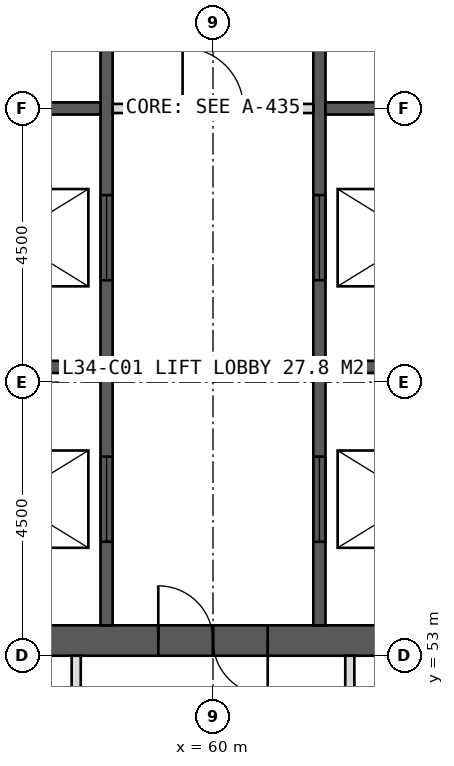
"""IFC4 building model, lengths in metres.
Left out: names, types, materials, properties, quantities, classifications, styles, units other than length and angle.
Written with IfcOpenShell. Run it as: python <this file> out.ifc"""

import sys

from ifc_helpers import new_model, si_unit, direction, frame, frame_2d, origin, place, context, subcontext, project, spatial, rectangle, extrude, element, fill, save


model = new_model("IFC4")
c1 = context("Model", 3, precision=1e-05, world=origin(), true_north=direction((0.0, 1.0)))
c2 = subcontext(c1, "Body", "Model", "MODEL_VIEW")
j1 = project(units=[si_unit("LENGTHUNIT", "METRE"), si_unit("PLANEANGLEUNIT", "RADIAN")], contexts=[c1])
p1 = place(None, origin())
s1 = spatial("IfcSite", under=j1, at=p1, CompositionType="ELEMENT")
p2 = place(p1, origin())
s2 = spatial("IfcBuilding", under=s1, at=p2, CompositionType="ELEMENT")
p3 = place(p2, frame((0.0, 0.0, 144.0)))
s3 = spatial("IfcBuildingStorey", under=s2, at=p3, CompositionType="ELEMENT", Elevation=144.0)
p4 = place(p3, frame((51.0, 53.25, 0.0), z_axis=(0.0, 0.0, 1.0), x_axis=(1.0, 0.0, 0.0)))
e1 = element("IfcWall", 1, at=p4, inside=s3, PredefinedType="SHEAR", context=c2, shape_type="SweptSolid", body=[
    extrude(rectangle(XDim=18.0, YDim=0.5, at=frame_2d((9.0, 0.0))), origin(), (0.0, 0.0, 1.0), 4.0),
])
p5 = place(p4, frame((8.1, 0.0, 0.0)))
e2 = element("IfcOpeningElement", 2, at=p5, cuts=e1, PredefinedType="OPENING", context=c2, shape_type="SweptSolid", body=[
    extrude(rectangle(XDim=1.8, YDim=2.2, at=frame_2d((0.9, 1.1))), frame((0.0, 0.26, 0.0), z_axis=(0.0, -1.0, 0.0), x_axis=(1.0, 0.0, 0.0)), (0.0, 0.0, 1.0), 0.52),
])
p6 = place(p3, frame((58.25, 53.5, 0.0), z_axis=(0.0, 0.0, 1.0), x_axis=(0.0, 1.0, 0.0)))
e3 = element("IfcWall", 3, at=p6, inside=s3, PredefinedType="SHEAR", context=c2, shape_type="SweptSolid", body=[
    extrude(rectangle(XDim=17.0, YDim=0.2, at=frame_2d((8.5, 0.0))), origin(), (0.0, 0.0, 1.0), 4.0),
])
p7 = place(p6, frame((1.375, 0.0, 0.0)))
e4 = element("IfcOpeningElement", 4, at=p7, cuts=e3, PredefinedType="OPENING", context=c2, shape_type="SweptSolid", body=[
    extrude(rectangle(XDim=1.4, YDim=2.2, at=frame_2d((0.7, 1.1))), frame((0.0, 0.11, 0.0), z_axis=(0.0, -1.0, 0.0), x_axis=(1.0, 0.0, 0.0)), (0.0, 0.0, 1.0), 0.22),
])
p8 = place(p6, frame((5.675, 0.0, 0.0)))
e5 = element("IfcOpeningElement", 5, at=p8, cuts=e3, PredefinedType="OPENING", context=c2, shape_type="SweptSolid", body=[
    extrude(rectangle(XDim=1.4, YDim=2.2, at=frame_2d((0.7, 1.1))), frame((0.0, 0.11, 0.0), z_axis=(0.0, -1.0, 0.0), x_axis=(1.0, 0.0, 0.0)), (0.0, 0.0, 1.0), 0.22),
])
p9 = place(p3, frame((61.75, 53.5, 0.0), z_axis=(0.0, 0.0, 1.0), x_axis=(0.0, 1.0, 0.0)))
e6 = element("IfcWall", 6, at=p9, inside=s3, PredefinedType="SHEAR", context=c2, shape_type="SweptSolid", body=[
    extrude(rectangle(XDim=17.0, YDim=0.2, at=frame_2d((8.5, 0.0))), origin(), (0.0, 0.0, 1.0), 4.0),
])
p10 = place(p9, frame((1.375, 0.0, 0.0)))
e7 = element("IfcOpeningElement", 7, at=p10, cuts=e6, PredefinedType="OPENING", context=c2, shape_type="SweptSolid", body=[
    extrude(rectangle(XDim=1.4, YDim=2.2, at=frame_2d((0.7, 1.1))), frame((0.0, 0.11, 0.0), z_axis=(0.0, -1.0, 0.0), x_axis=(1.0, 0.0, 0.0)), (0.0, 0.0, 1.0), 0.22),
])
p11 = place(p9, frame((5.675, 0.0, 0.0)))
e8 = element("IfcOpeningElement", 8, at=p11, cuts=e6, PredefinedType="OPENING", context=c2, shape_type="SweptSolid", body=[
    extrude(rectangle(XDim=1.4, YDim=2.2, at=frame_2d((0.7, 1.1))), frame((0.0, 0.11, 0.0), z_axis=(0.0, -1.0, 0.0), x_axis=(1.0, 0.0, 0.0)), (0.0, 0.0, 1.0), 0.22),
])
for number, where, z_axis, x_axis in (
    (9, (55.1, 57.75, 0.0), (0.0, 0.0, 1.0), (1.0, 0.0, 0.0)),
    (10, (61.85, 57.75, 0.0), (0.0, 0.0, 1.0), (1.0, 0.0, 0.0)),
    (11, (55.1, 62.0, 0.0), (0.0, 0.0, 1.0), (1.0, 0.0, 0.0)),
    (12, (61.85, 62.0, 0.0), (0.0, 0.0, 1.0), (1.0, 0.0, 0.0)),
):
    element("IfcWall", number, at=place(p3, frame(where, z_axis=z_axis, x_axis=x_axis)), inside=s3, PredefinedType="SHEAR", context=c2, shape_type="SweptSolid", body=[
        extrude(rectangle(XDim=3.05, YDim=0.2, at=frame_2d((1.525, 0.0))), origin(), (0.0, 0.0, 1.0), 4.0),
    ])
p12 = place(p3, frame((62.25, 53.0, 0.0), z_axis=(0.0, 0.0, 1.0), x_axis=(0.0, -1.0, 0.0)))
e13 = element("IfcWall", 13, at=p12, inside=s3, PredefinedType="PARTITIONING", context=c2, shape_type="SweptSolid", body=[
    extrude(rectangle(XDim=6.6, YDim=0.15, at=frame_2d((3.3, 0.0))), origin(), (0.0, 0.0, 1.0), 3.75),
])
p13 = place(p12, frame((0.6, 0.0, 0.0)))
e14 = element("IfcOpeningElement", 14, at=p13, cuts=e13, PredefinedType="OPENING", context=c2, shape_type="SweptSolid", body=[
    extrude(rectangle(XDim=0.9, YDim=2.1, at=frame_2d((0.45, 1.05))), frame((0.0, 0.085, 0.0), z_axis=(0.0, -1.0, 0.0), x_axis=(1.0, 0.0, 0.0)), (0.0, 0.0, 1.0), 0.17),
])
p14 = place(p3, frame((57.75, 53.0, 0.0), z_axis=(0.0, 0.0, 1.0), x_axis=(0.0, -1.0, 0.0)))
e15 = element("IfcWall", 15, at=p14, inside=s3, PredefinedType="PARTITIONING", context=c2, shape_type="SweptSolid", body=[
    extrude(rectangle(XDim=6.6, YDim=0.15, at=frame_2d((3.3, 0.0))), origin(), (0.0, 0.0, 1.0), 3.75),
])
p15 = place(p3, frame((58.35, 62.0, 0.0), z_axis=(0.0, 0.0, 1.0), x_axis=(1.0, 0.0, 0.0)))
e16 = element("IfcWall", 16, at=p15, inside=s3, PredefinedType="PARTITIONING", context=c2, shape_type="SweptSolid", body=[
    extrude(rectangle(XDim=3.3, YDim=0.15, at=frame_2d((1.65, 0.0))), origin(), (0.0, 0.0, 1.0), 3.75),
])
p16 = place(p15, frame((1.15, 0.0, 0.0)))
e17 = element("IfcOpeningElement", 17, at=p16, cuts=e16, PredefinedType="OPENING", context=c2, shape_type="SweptSolid", body=[
    extrude(rectangle(XDim=1.0, YDim=2.1, at=frame_2d((0.5, 1.05))), frame((0.0, 0.085, 0.0), z_axis=(0.0, -1.0, 0.0), x_axis=(1.0, 0.0, 0.0)), (0.0, 0.0, 1.0), 0.17),
])
p17 = place(p5, origin())
e18 = element("IfcDoor", 18, at=p17, inside=s3, OperationType="DOUBLE_DOOR_SINGLE_SWING", PredefinedType="DOOR", context=c2, shape_type="SweptSolid", body=[
    extrude(rectangle(XDim=1.8, YDim=2.2, at=frame_2d((0.9, 1.1))), frame((0.0, 0.025, 0.0), z_axis=(0.0, -1.0, 0.0), x_axis=(1.0, 0.0, 0.0)), (0.0, 0.0, 1.0), 0.05),
])
fill(e2, e18)
p18 = place(p7, origin())
e19 = element("IfcDoor", 19, at=p18, inside=s3, OperationType="SLIDING_TO_LEFT", PredefinedType="DOOR", context=c2, shape_type="SweptSolid", body=[
    extrude(rectangle(XDim=1.4, YDim=2.2, at=frame_2d((0.7, 1.1))), frame((0.0, 0.025, 0.0), z_axis=(0.0, -1.0, 0.0), x_axis=(1.0, 0.0, 0.0)), (0.0, 0.0, 1.0), 0.05),
])
fill(e4, e19)
p19 = place(p10, origin())
e20 = element("IfcDoor", 20, at=p19, inside=s3, OperationType="SLIDING_TO_LEFT", PredefinedType="DOOR", context=c2, shape_type="SweptSolid", body=[
    extrude(rectangle(XDim=1.4, YDim=2.2, at=frame_2d((0.7, 1.1))), frame((0.0, 0.025, 0.0), z_axis=(0.0, -1.0, 0.0), x_axis=(1.0, 0.0, 0.0)), (0.0, 0.0, 1.0), 0.05),
])
fill(e7, e20)
p20 = place(p8, origin())
e21 = element("IfcDoor", 21, at=p20, inside=s3, OperationType="SLIDING_TO_LEFT", PredefinedType="DOOR", context=c2, shape_type="SweptSolid", body=[
    extrude(rectangle(XDim=1.4, YDim=2.2, at=frame_2d((0.7, 1.1))), frame((0.0, 0.025, 0.0), z_axis=(0.0, -1.0, 0.0), x_axis=(1.0, 0.0, 0.0)), (0.0, 0.0, 1.0), 0.05),
])
fill(e5, e21)
p21 = place(p11, origin())
e22 = element("IfcDoor", 22, at=p21, inside=s3, OperationType="SLIDING_TO_LEFT", PredefinedType="DOOR", context=c2, shape_type="SweptSolid", body=[
    extrude(rectangle(XDim=1.4, YDim=2.2, at=frame_2d((0.7, 1.1))), frame((0.0, 0.025, 0.0), z_axis=(0.0, -1.0, 0.0), x_axis=(1.0, 0.0, 0.0)), (0.0, 0.0, 1.0), 0.05),
])
fill(e8, e22)
p22 = place(p16, origin())
e23 = element("IfcDoor", 23, at=p22, inside=s3, OperationType="SINGLE_SWING_LEFT", PredefinedType="DOOR", context=c2, shape_type="SweptSolid", body=[
    extrude(rectangle(XDim=1.0, YDim=2.1, at=frame_2d((0.5, 1.05))), frame((0.0, 0.025, 0.0), z_axis=(0.0, -1.0, 0.0), x_axis=(1.0, 0.0, 0.0)), (0.0, 0.0, 1.0), 0.05),
])
fill(e17, e23)
save(model, sys.argv[1])
